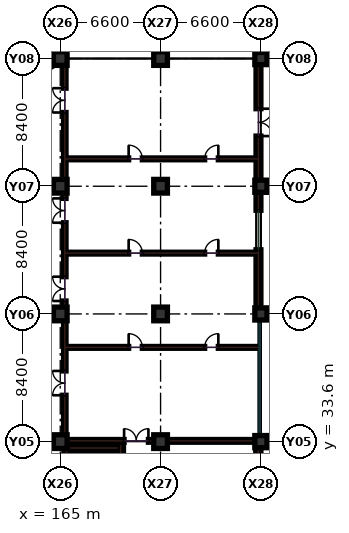
"""IFC4 building model, lengths in metres.
Left out: names, types, materials, properties, quantities, classifications, styles, units other than length and angle.
Written with IfcOpenShell. Run it as: python <this file> out.ifc"""

import sys

from ifc_helpers import new_model, si_unit, direction, frame, frame_2d, origin, origin_2d, place, context, subcontext, project, spatial, rectangle, extrude, element, fill, save


model = new_model("IFC4")
c1 = context("Model", 3, precision=1e-05, world=origin(), true_north=direction((0.0, 1.0)))
c2 = subcontext(c1, "Body", "Model", "MODEL_VIEW")
j1 = project(units=[si_unit("LENGTHUNIT", "METRE"), si_unit("PLANEANGLEUNIT", "RADIAN")], contexts=[c1])
p1 = place(None, origin())
s1 = spatial("IfcSite", under=j1, at=p1, CompositionType="ELEMENT")
p2 = place(p1, origin())
s2 = spatial("IfcBuilding", under=s1, at=p2, CompositionType="ELEMENT")
p3 = place(p2, origin())
s3 = spatial("IfcBuildingStorey", under=s2, at=p3, CompositionType="ELEMENT", Elevation=0.0)
for number, where, z_axis, x_axis in (
    (1, (165.0, 33.6, 0.0), (0.0, 0.0, 1.0), (1.0, 0.0, 0.0)),
    (2, (165.0, 42.0, 0.0), (0.0, 0.0, 1.0), (1.0, 0.0, 0.0)),
    (3, (165.0, 50.4, 0.0), (0.0, 0.0, 1.0), (1.0, 0.0, 0.0)),
    (4, (165.0, 58.8, 0.0), (0.0, 0.0, 1.0), (1.0, 0.0, 0.0)),
    (5, (171.6, 33.6, 0.0), (0.0, 0.0, 1.0), (1.0, 0.0, 0.0)),
    (6, (171.6, 42.0, 0.0), (0.0, 0.0, 1.0), (1.0, 0.0, 0.0)),
    (7, (171.6, 50.4, 0.0), (0.0, 0.0, 1.0), (1.0, 0.0, 0.0)),
    (8, (171.6, 58.8, 0.0), (0.0, 0.0, 1.0), (1.0, 0.0, 0.0)),
):
    element("IfcColumn", number, at=place(p3, frame(where, z_axis=z_axis, x_axis=x_axis)), inside=s3, PredefinedType="COLUMN", context=c2, shape_type="SweptSolid", body=[
        extrude(rectangle(XDim=0.9, YDim=0.9, at=origin_2d()), origin(), (0.0, 0.0, 1.0), 5.4),
    ])
for number, where, z_axis, x_axis in (
    (9, (178.2, 33.6, 0.0), (0.0, 0.0, 1.0), (1.0, 0.0, 0.0)),
    (10, (178.2, 42.0, 0.0), (0.0, 0.0, 1.0), (1.0, 0.0, 0.0)),
    (11, (178.2, 50.4, 0.0), (0.0, 0.0, 1.0), (1.0, 0.0, 0.0)),
    (12, (178.2, 58.8, 0.0), (0.0, 0.0, 1.0), (1.0, 0.0, 0.0)),
):
    element("IfcColumn", number, at=place(p3, frame(where, z_axis=z_axis, x_axis=x_axis)), inside=s3, PredefinedType="COLUMN", context=c2, shape_type="SweptSolid", body=[
        extrude(rectangle(XDim=0.8, YDim=0.8, at=origin_2d()), origin(), (0.0, 0.0, 1.0), 5.4),
    ])
p4 = place(p3, frame((165.3, 33.65, 0.0), z_axis=(0.0, 0.0, 1.0), x_axis=(1.0, 0.0, 0.0)))
e13 = element("IfcWall", 13, at=p4, inside=s3, PredefinedType="SOLIDWALL", context=c2, shape_type="SweptSolid", body=[
    extrude(rectangle(XDim=5.85, YDim=0.18, at=frame_2d((2.925, 0.0))), origin(), (0.0, 0.0, 1.0), 4.235),
])
p5 = place(p4, frame((3.9, 0.0, 0.0)))
e14 = element("IfcOpeningElement", 14, at=p5, cuts=e13, PredefinedType="OPENING", context=c2, shape_type="SweptSolid", body=[
    extrude(rectangle(XDim=1.6, YDim=2.2, at=frame_2d((0.8, 1.1))), frame((0.0, 0.1, 0.0), z_axis=(0.0, -1.0, 0.0), x_axis=(1.0, 0.0, 0.0)), (0.0, 0.0, 1.0), 0.2),
])
p6 = place(p3, frame((172.05, 33.65, 0.0), z_axis=(0.0, 0.0, 1.0), x_axis=(1.0, 0.0, 0.0)))
e15 = element("IfcWall", 15, at=p6, inside=s3, PredefinedType="SOLIDWALL", context=c2, shape_type="SweptSolid", body=[
    extrude(rectangle(XDim=5.95, YDim=0.18, at=frame_2d((2.975, 0.0))), origin(), (0.0, 0.0, 1.0), 4.235),
])
p7 = place(p3, frame((165.3, 33.65, 0.0), z_axis=(0.0, 0.0, 1.0), x_axis=(0.0, 1.0, 0.0)))
e16 = element("IfcWall", 16, at=p7, inside=s3, PredefinedType="PARTITIONING", context=c2, shape_type="SweptSolid", body=[
    extrude(rectangle(XDim=7.9, YDim=0.16, at=frame_2d((3.95, 0.0))), origin(), (0.0, 0.0, 1.0), 4.25),
])
p8 = place(p7, frame((3.0, 0.0, 0.0)))
e17 = element("IfcOpeningElement", 17, at=p8, cuts=e16, PredefinedType="OPENING", context=c2, shape_type="SweptSolid", body=[
    extrude(rectangle(XDim=1.6, YDim=2.2, at=frame_2d((0.8, 1.1))), frame((0.0, 0.09, 0.0), z_axis=(0.0, -1.0, 0.0), x_axis=(1.0, 0.0, 0.0)), (0.0, 0.0, 1.0), 0.18),
])
p9 = place(p3, frame((165.3, 42.45, 0.0), z_axis=(0.0, 0.0, 1.0), x_axis=(0.0, 1.0, 0.0)))
e18 = element("IfcWall", 18, at=p9, inside=s3, PredefinedType="PARTITIONING", context=c2, shape_type="SweptSolid", body=[
    extrude(rectangle(XDim=7.5, YDim=0.16, at=frame_2d((3.75, 0.0))), origin(), (0.0, 0.0, 1.0), 4.25),
])
p10 = place(p9, frame((0.4, 0.0, 0.0)))
e19 = element("IfcOpeningElement", 19, at=p10, cuts=e18, PredefinedType="OPENING", context=c2, shape_type="SweptSolid", body=[
    extrude(rectangle(XDim=1.6, YDim=2.2, at=frame_2d((0.8, 1.1))), frame((0.0, 0.09, 0.0), z_axis=(0.0, -1.0, 0.0), x_axis=(1.0, 0.0, 0.0)), (0.0, 0.0, 1.0), 0.18),
])
p11 = place(p9, frame((5.55, 0.0, 0.0)))
e20 = element("IfcOpeningElement", 20, at=p11, cuts=e18, PredefinedType="OPENING", context=c2, shape_type="SweptSolid", body=[
    extrude(rectangle(XDim=1.6, YDim=2.2, at=frame_2d((0.8, 1.1))), frame((0.0, 0.09, 0.0), z_axis=(0.0, -1.0, 0.0), x_axis=(1.0, 0.0, 0.0)), (0.0, 0.0, 1.0), 0.18),
])
p12 = place(p3, frame((165.3, 50.85, 0.0), z_axis=(0.0, 0.0, 1.0), x_axis=(0.0, 1.0, 0.0)))
e21 = element("IfcWall", 21, at=p12, inside=s3, PredefinedType="PARTITIONING", context=c2, shape_type="SweptSolid", body=[
    extrude(rectangle(XDim=7.65, YDim=0.16, at=frame_2d((3.825, 0.0))), origin(), (0.0, 0.0, 1.0), 4.25),
])
p13 = place(p12, frame((4.4, 0.0, 0.0)))
e22 = element("IfcOpeningElement", 22, at=p13, cuts=e21, PredefinedType="OPENING", context=c2, shape_type="SweptSolid", body=[
    extrude(rectangle(XDim=1.6, YDim=2.2, at=frame_2d((0.8, 1.1))), frame((0.0, 0.09, 0.0), z_axis=(0.0, -1.0, 0.0), x_axis=(1.0, 0.0, 0.0)), (0.0, 0.0, 1.0), 0.18),
])
p14 = place(p3, frame((165.3, 39.8, 0.0), z_axis=(0.0, 0.0, 1.0), x_axis=(1.0, 0.0, 0.0)))
e23 = element("IfcWall", 23, at=p14, inside=s3, PredefinedType="PARTITIONING", context=c2, shape_type="SweptSolid", body=[
    extrude(rectangle(XDim=12.75, YDim=0.12, at=frame_2d((6.375, 0.0))), origin(), (0.0, 0.0, 1.0), 4.25),
])
p15 = place(p14, frame((4.2, 0.0, 0.0)))
e24 = element("IfcOpeningElement", 24, at=p15, cuts=e23, PredefinedType="OPENING", context=c2, shape_type="SweptSolid", body=[
    extrude(rectangle(XDim=0.9, YDim=2.1, at=frame_2d((0.45, 1.05))), frame((0.0, 0.07, 0.0), z_axis=(0.0, -1.0, 0.0), x_axis=(1.0, 0.0, 0.0)), (0.0, 0.0, 1.0), 0.14),
])
p16 = place(p14, frame((9.2, 0.0, 0.0)))
e25 = element("IfcOpeningElement", 25, at=p16, cuts=e23, PredefinedType="OPENING", context=c2, shape_type="SweptSolid", body=[
    extrude(rectangle(XDim=0.9, YDim=2.1, at=frame_2d((0.45, 1.05))), frame((0.0, 0.07, 0.0), z_axis=(0.0, -1.0, 0.0), x_axis=(1.0, 0.0, 0.0)), (0.0, 0.0, 1.0), 0.14),
])
p17 = place(p3, frame((165.3, 46.0, 0.0), z_axis=(0.0, 0.0, 1.0), x_axis=(1.0, 0.0, 0.0)))
e26 = element("IfcWall", 26, at=p17, inside=s3, PredefinedType="PARTITIONING", context=c2, shape_type="SweptSolid", body=[
    extrude(rectangle(XDim=12.75, YDim=0.12, at=frame_2d((6.375, 0.0))), origin(), (0.0, 0.0, 1.0), 4.25),
])
p18 = place(p17, frame((4.2, 0.0, 0.0)))
e27 = element("IfcOpeningElement", 27, at=p18, cuts=e26, PredefinedType="OPENING", context=c2, shape_type="SweptSolid", body=[
    extrude(rectangle(XDim=0.9, YDim=2.1, at=frame_2d((0.45, 1.05))), frame((0.0, 0.07, 0.0), z_axis=(0.0, -1.0, 0.0), x_axis=(1.0, 0.0, 0.0)), (0.0, 0.0, 1.0), 0.14),
])
p19 = place(p17, frame((9.2, 0.0, 0.0)))
e28 = element("IfcOpeningElement", 28, at=p19, cuts=e26, PredefinedType="OPENING", context=c2, shape_type="SweptSolid", body=[
    extrude(rectangle(XDim=0.9, YDim=2.1, at=frame_2d((0.45, 1.05))), frame((0.0, 0.07, 0.0), z_axis=(0.0, -1.0, 0.0), x_axis=(1.0, 0.0, 0.0)), (0.0, 0.0, 1.0), 0.14),
])
p20 = place(p3, frame((165.3, 52.2, 0.0), z_axis=(0.0, 0.0, 1.0), x_axis=(1.0, 0.0, 0.0)))
e29 = element("IfcWall", 29, at=p20, inside=s3, PredefinedType="PARTITIONING", context=c2, shape_type="SweptSolid", body=[
    extrude(rectangle(XDim=12.75, YDim=0.12, at=frame_2d((6.375, 0.0))), origin(), (0.0, 0.0, 1.0), 4.25),
])
p21 = place(p20, frame((4.2, 0.0, 0.0)))
e30 = element("IfcOpeningElement", 30, at=p21, cuts=e29, PredefinedType="OPENING", context=c2, shape_type="SweptSolid", body=[
    extrude(rectangle(XDim=0.9, YDim=2.1, at=frame_2d((0.45, 1.05))), frame((0.0, 0.07, 0.0), z_axis=(0.0, -1.0, 0.0), x_axis=(1.0, 0.0, 0.0)), (0.0, 0.0, 1.0), 0.14),
])
p22 = place(p20, frame((9.2, 0.0, 0.0)))
e31 = element("IfcOpeningElement", 31, at=p22, cuts=e29, PredefinedType="OPENING", context=c2, shape_type="SweptSolid", body=[
    extrude(rectangle(XDim=0.9, YDim=2.1, at=frame_2d((0.45, 1.05))), frame((0.0, 0.07, 0.0), z_axis=(0.0, -1.0, 0.0), x_axis=(1.0, 0.0, 0.0)), (0.0, 0.0, 1.0), 0.14),
])
p23 = place(p3, frame((178.03, 25.595, 0.0), z_axis=(0.0, 0.0, 1.0), x_axis=(0.0, 1.0, 0.0)))
e32 = element("IfcWall", 32, at=p23, inside=s3, PredefinedType="SHEAR", context=c2, shape_type="SweptSolid", body=[
    extrude(rectangle(XDim=7.61, YDim=0.34, at=frame_2d((3.805, 0.0))), origin(), (0.0, 0.0, 1.0), 5.1),
])
p24 = place(p3, frame((178.04, 42.395, 0.0), z_axis=(0.0, 0.0, 1.0), x_axis=(0.0, 1.0, 0.0)))
e33 = element("IfcWall", 33, at=p24, inside=s3, PredefinedType="SOLIDWALL", context=c2, shape_type="SweptSolid", body=[
    extrude(rectangle(XDim=7.61, YDim=0.32, at=frame_2d((3.805, 0.0))), origin(), (0.0, 0.0, 1.0), 4.335),
])
p25 = place(p24, frame((3.825, 0.0, 0.95)))
e34 = element("IfcOpeningElement", 34, at=p25, cuts=e33, PredefinedType="OPENING", context=c2, shape_type="SweptSolid", body=[
    extrude(rectangle(XDim=2.6, YDim=1.9, at=frame_2d((1.3, 0.95))), frame((0.0, 0.17, 0.0), z_axis=(0.0, -1.0, 0.0), x_axis=(1.0, 0.0, 0.0)), (0.0, 0.0, 1.0), 0.34),
])
p26 = place(p3, frame((178.04, 50.795, 0.0), z_axis=(0.0, 0.0, 1.0), x_axis=(0.0, 1.0, 0.0)))
e35 = element("IfcWall", 35, at=p26, inside=s3, PredefinedType="SOLIDWALL", context=c2, shape_type="SweptSolid", body=[
    extrude(rectangle(XDim=7.61, YDim=0.32, at=frame_2d((3.805, 0.0))), origin(), (0.0, 0.0, 1.0), 4.335),
])
p27 = place(p26, frame((2.905, 0.0, 0.0)))
e36 = element("IfcOpeningElement", 36, at=p27, cuts=e35, PredefinedType="OPENING", context=c2, shape_type="SweptSolid", body=[
    extrude(rectangle(XDim=1.8, YDim=2.2, at=frame_2d((0.9, 1.1))), frame((0.0, 0.17, 0.0), z_axis=(0.0, -1.0, 0.0), x_axis=(1.0, 0.0, 0.0)), (0.0, 0.0, 1.0), 0.34),
])
p28 = place(p3, frame((178.04, 59.195, 0.0), z_axis=(0.0, 0.0, 1.0), x_axis=(0.0, 1.0, 0.0)))
e37 = element("IfcWall", 37, at=p28, inside=s3, PredefinedType="SOLIDWALL", context=c2, shape_type="SweptSolid", body=[
    extrude(rectangle(XDim=7.71, YDim=0.32, at=frame_2d((3.855, 0.0))), origin(), (0.0, 0.0, 1.0), 4.335),
])
p29 = place(p28, frame((0.65, 0.0, 0.95)))
e38 = element("IfcOpeningElement", 38, at=p29, cuts=e37, PredefinedType="OPENING", context=c2, shape_type="SweptSolid", body=[
    extrude(rectangle(XDim=1.2, YDim=1.5, at=frame_2d((0.6, 0.75))), frame((0.0, 0.17, 0.0), z_axis=(0.0, -1.0, 0.0), x_axis=(1.0, 0.0, 0.0)), (0.0, 0.0, 1.0), 0.34),
])
p30 = place(p28, frame((5.86, 0.0, 0.95)))
e39 = element("IfcOpeningElement", 39, at=p30, cuts=e37, PredefinedType="OPENING", context=c2, shape_type="SweptSolid", body=[
    extrude(rectangle(XDim=1.2, YDim=1.5, at=frame_2d((0.6, 0.75))), frame((0.0, 0.17, 0.0), z_axis=(0.0, -1.0, 0.0), x_axis=(1.0, 0.0, 0.0)), (0.0, 0.0, 1.0), 0.34),
])
p31 = place(p3, frame((158.65, 54.76, 0.0), z_axis=(0.0, 0.0, 1.0), x_axis=(0.843786613851, 0.536678814829, 0.0)))
e40 = element("IfcWall", 40, at=p31, inside=s3, PredefinedType="SOLIDWALL", context=c2, shape_type="SweptSolid", body=[
    extrude(rectangle(XDim=7.229, YDim=0.32, at=frame_2d((3.615, 0.0))), origin(), (0.0, 0.0, 1.0), 4.485),
])
p32 = place(p31, frame((2.415, 0.0, 0.95)))
e41 = element("IfcOpeningElement", 41, at=p32, cuts=e40, PredefinedType="OPENING", context=c2, shape_type="SweptSolid", body=[
    extrude(rectangle(XDim=2.4, YDim=1.6, at=frame_2d((1.2, 0.8))), frame((0.0, 0.17, 0.0), z_axis=(0.0, -1.0, 0.0), x_axis=(1.0, 0.0, 0.0)), (0.0, 0.0, 1.0), 0.34),
])
p33 = place(p3, frame((165.42, 25.19, 0.0), z_axis=(0.0, 0.0, 1.0), x_axis=(0.0, 1.0, 0.0)))
e42 = element("IfcWall", 42, at=p33, inside=s3, PredefinedType="SHEAR", context=c2, shape_type="SweptSolid", body=[
    extrude(rectangle(XDim=8.17, YDim=0.36, at=frame_2d((4.085, 0.0))), origin(), (0.0, 0.0, 1.0), 5.1),
])
p34 = place(p3, frame((168.98, 25.19, 0.0), z_axis=(0.0, 0.0, 1.0), x_axis=(0.0, 1.0, 0.0)))
e43 = element("IfcWall", 43, at=p34, inside=s3, PredefinedType="SHEAR", context=c2, shape_type="SweptSolid", body=[
    extrude(rectangle(XDim=8.17, YDim=0.36, at=frame_2d((4.085, 0.0))), origin(), (0.0, 0.0, 1.0), 5.1),
])
p35 = place(p34, frame((0.45, 0.0, 0.0)))
e44 = element("IfcOpeningElement", 44, at=p35, cuts=e43, PredefinedType="OPENING", context=c2, shape_type="SweptSolid", body=[
    extrude(rectangle(XDim=1.25, YDim=2.15, at=frame_2d((0.625, 1.075))), frame((0.0, 0.19, 0.0), z_axis=(0.0, -1.0, 0.0), x_axis=(1.0, 0.0, 0.0)), (0.0, 0.0, 1.0), 0.38),
])
p36 = place(p3, frame((165.6, 33.18, 0.0), z_axis=(0.0, 0.0, 1.0), x_axis=(1.0, 0.0, 0.0)))
e45 = element("IfcWall", 45, at=p36, inside=s3, PredefinedType="SHEAR", context=c2, shape_type="SweptSolid", body=[
    extrude(rectangle(XDim=3.2, YDim=0.36, at=frame_2d((1.6, 0.0))), origin(), (0.0, 0.0, 1.0), 5.1),
])
p37 = place(p5, origin())
e46 = element("IfcDoor", 46, at=p37, inside=s3, OperationType="DOUBLE_DOOR_SINGLE_SWING", PredefinedType="DOOR", context=c2, shape_type="SweptSolid", body=[
    extrude(rectangle(XDim=1.6, YDim=2.2, at=frame_2d((0.8, 1.1))), frame((0.0, 0.025, 0.0), z_axis=(0.0, -1.0, 0.0), x_axis=(1.0, 0.0, 0.0)), (0.0, 0.0, 1.0), 0.05),
])
fill(e14, e46)
p38 = place(p8, origin())
e47 = element("IfcDoor", 47, at=p38, inside=s3, OperationType="DOUBLE_DOOR_SINGLE_SWING", PredefinedType="DOOR", context=c2, shape_type="SweptSolid", body=[
    extrude(rectangle(XDim=1.6, YDim=2.2, at=frame_2d((0.8, 1.1))), frame((0.0, 0.025, 0.0), z_axis=(0.0, -1.0, 0.0), x_axis=(1.0, 0.0, 0.0)), (0.0, 0.0, 1.0), 0.05),
])
fill(e17, e47)
p39 = place(p10, origin())
e48 = element("IfcDoor", 48, at=p39, inside=s3, OperationType="DOUBLE_DOOR_SINGLE_SWING", PredefinedType="DOOR", context=c2, shape_type="SweptSolid", body=[
    extrude(rectangle(XDim=1.6, YDim=2.2, at=frame_2d((0.8, 1.1))), frame((0.0, 0.025, 0.0), z_axis=(0.0, -1.0, 0.0), x_axis=(1.0, 0.0, 0.0)), (0.0, 0.0, 1.0), 0.05),
])
fill(e19, e48)
p40 = place(p11, origin())
e49 = element("IfcDoor", 49, at=p40, inside=s3, OperationType="DOUBLE_DOOR_SINGLE_SWING", PredefinedType="DOOR", context=c2, shape_type="SweptSolid", body=[
    extrude(rectangle(XDim=1.6, YDim=2.2, at=frame_2d((0.8, 1.1))), frame((0.0, 0.025, 0.0), z_axis=(0.0, -1.0, 0.0), x_axis=(1.0, 0.0, 0.0)), (0.0, 0.0, 1.0), 0.05),
])
fill(e20, e49)
p41 = place(p13, origin())
e50 = element("IfcDoor", 50, at=p41, inside=s3, OperationType="DOUBLE_DOOR_SINGLE_SWING", PredefinedType="DOOR", context=c2, shape_type="SweptSolid", body=[
    extrude(rectangle(XDim=1.6, YDim=2.2, at=frame_2d((0.8, 1.1))), frame((0.0, 0.025, 0.0), z_axis=(0.0, -1.0, 0.0), x_axis=(1.0, 0.0, 0.0)), (0.0, 0.0, 1.0), 0.05),
])
fill(e22, e50)
p42 = place(p15, origin())
e51 = element("IfcDoor", 51, at=p42, inside=s3, OperationType="SINGLE_SWING_LEFT", PredefinedType="DOOR", context=c2, shape_type="SweptSolid", body=[
    extrude(rectangle(XDim=0.9, YDim=2.1, at=frame_2d((0.45, 1.05))), frame((0.0, 0.025, 0.0), z_axis=(0.0, -1.0, 0.0), x_axis=(1.0, 0.0, 0.0)), (0.0, 0.0, 1.0), 0.05),
])
fill(e24, e51)
p43 = place(p16, origin())
e52 = element("IfcDoor", 52, at=p43, inside=s3, OperationType="SINGLE_SWING_RIGHT", PredefinedType="DOOR", context=c2, shape_type="SweptSolid", body=[
    extrude(rectangle(XDim=0.9, YDim=2.1, at=frame_2d((0.45, 1.05))), frame((0.0, 0.025, 0.0), z_axis=(0.0, -1.0, 0.0), x_axis=(1.0, 0.0, 0.0)), (0.0, 0.0, 1.0), 0.05),
])
fill(e25, e52)
p44 = place(p18, origin())
e53 = element("IfcDoor", 53, at=p44, inside=s3, OperationType="SINGLE_SWING_LEFT", PredefinedType="DOOR", context=c2, shape_type="SweptSolid", body=[
    extrude(rectangle(XDim=0.9, YDim=2.1, at=frame_2d((0.45, 1.05))), frame((0.0, 0.025, 0.0), z_axis=(0.0, -1.0, 0.0), x_axis=(1.0, 0.0, 0.0)), (0.0, 0.0, 1.0), 0.05),
])
fill(e27, e53)
p45 = place(p19, origin())
e54 = element("IfcDoor", 54, at=p45, inside=s3, OperationType="SINGLE_SWING_RIGHT", PredefinedType="DOOR", context=c2, shape_type="SweptSolid", body=[
    extrude(rectangle(XDim=0.9, YDim=2.1, at=frame_2d((0.45, 1.05))), frame((0.0, 0.025, 0.0), z_axis=(0.0, -1.0, 0.0), x_axis=(1.0, 0.0, 0.0)), (0.0, 0.0, 1.0), 0.05),
])
fill(e28, e54)
p46 = place(p21, origin())
e55 = element("IfcDoor", 55, at=p46, inside=s3, OperationType="SINGLE_SWING_LEFT", PredefinedType="DOOR", context=c2, shape_type="SweptSolid", body=[
    extrude(rectangle(XDim=0.9, YDim=2.1, at=frame_2d((0.45, 1.05))), frame((0.0, 0.025, 0.0), z_axis=(0.0, -1.0, 0.0), x_axis=(1.0, 0.0, 0.0)), (0.0, 0.0, 1.0), 0.05),
])
fill(e30, e55)
p47 = place(p22, origin())
e56 = element("IfcDoor", 56, at=p47, inside=s3, OperationType="SINGLE_SWING_RIGHT", PredefinedType="DOOR", context=c2, shape_type="SweptSolid", body=[
    extrude(rectangle(XDim=0.9, YDim=2.1, at=frame_2d((0.45, 1.05))), frame((0.0, 0.025, 0.0), z_axis=(0.0, -1.0, 0.0), x_axis=(1.0, 0.0, 0.0)), (0.0, 0.0, 1.0), 0.05),
])
fill(e31, e56)
p48 = place(p25, origin())
e57 = element("IfcWindow", 57, at=p48, inside=s3, PartitioningType="SINGLE_PANEL", PredefinedType="WINDOW", context=c2, shape_type="SweptSolid", body=[
    extrude(rectangle(XDim=2.6, YDim=1.9, at=frame_2d((1.3, 0.95))), frame((0.0, 0.03, 0.0), z_axis=(0.0, -1.0, 0.0), x_axis=(1.0, 0.0, 0.0)), (0.0, 0.0, 1.0), 0.06),
])
fill(e34, e57)
p49 = place(p27, frame((1.8, 0.0, 0.0), z_axis=(0.0, 0.0, 1.0), x_axis=(-1.0, 0.0, 0.0)))
e58 = element("IfcDoor", 58, at=p49, inside=s3, OperationType="DOUBLE_DOOR_SINGLE_SWING", PredefinedType="DOOR", context=c2, shape_type="SweptSolid", body=[
    extrude(rectangle(XDim=1.8, YDim=2.2, at=frame_2d((0.9, 1.1))), frame((0.0, 0.025, 0.0), z_axis=(0.0, -1.0, 0.0), x_axis=(1.0, 0.0, 0.0)), (0.0, 0.0, 1.0), 0.05),
])
fill(e36, e58)
save(model, sys.argv[1])
